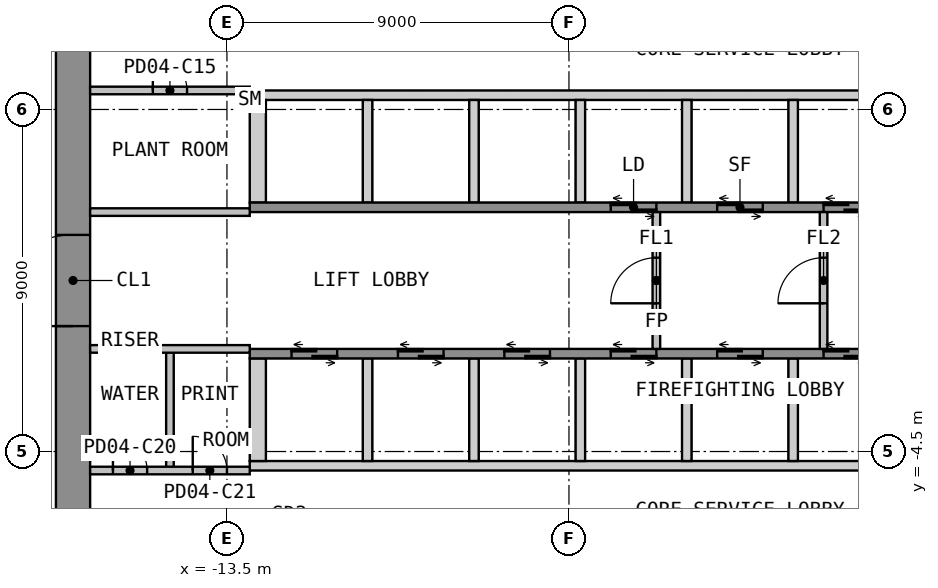
"""IFC4 building model, lengths in metres.
Left out: names, types, materials, properties, quantities, classifications, styles, units other than length and angle.
Written with IfcOpenShell. Run it as: python <this file> out.ifc"""

import sys

from ifc_helpers import new_model, si_unit, direction, frame, frame_2d, origin, place, context, subcontext, project, spatial, polyline, rectangle, outline, extrude, element, fill, save


model = new_model("IFC4")
c1 = context("Model", 3, precision=1e-05, world=origin(), true_north=direction((0.0, 1.0)))
c2 = subcontext(c1, "Body", "Model", "MODEL_VIEW")
j1 = project(units=[si_unit("LENGTHUNIT", "METRE"), si_unit("PLANEANGLEUNIT", "RADIAN")], contexts=[c1])
p1 = place(None, origin())
s1 = spatial("IfcSite", under=j1, at=p1, CompositionType="ELEMENT")
p2 = place(p1, origin())
s2 = spatial("IfcBuilding", under=s1, at=p2, CompositionType="ELEMENT")
p3 = place(p2, frame((0.0, 0.0, 20.4)))
s3 = spatial("IfcBuildingStorey", under=s2, at=p3, CompositionType="ELEMENT", Elevation=20.4)
p4 = place(p3, frame((-17.55, -12.6, 0.0), z_axis=(0.0, 0.0, 1.0), x_axis=(0.0, 1.0, 0.0)))
e1 = element("IfcWall", 1, at=p4, inside=s3, PredefinedType="SHEAR", context=c2, shape_type="SweptSolid", body=[
    extrude(rectangle(XDim=25.2, YDim=0.9, at=frame_2d((12.6, 0.0))), origin(), (0.0, 0.0, 1.0), 4.4),
])
p5 = place(p4, frame((11.4, 0.0, 0.0)))
e2 = element("IfcOpeningElement", 2, at=p5, cuts=e1, PredefinedType="OPENING", context=c2, shape_type="SweptSolid", body=[
    extrude(rectangle(XDim=2.4, YDim=2.1, at=frame_2d((1.2, 1.05))), frame((0.0, 0.46, 0.0), z_axis=(0.0, -1.0, 0.0), x_axis=(1.0, 0.0, 0.0)), (0.0, 0.0, 1.0), 0.92),
])
p6 = place(p3, origin())
e3 = element("IfcWall", 3, at=p6, inside=s3, PredefinedType="SHEAR", context=c2, shape_type="SweptSolid", body=[
    extrude(outline(polyline([(-12.9, 4.75), (12.9, 4.75), (12.9, 5.0), (-12.9, 5.0), (-12.9, 4.75)])), origin(), (0.0, 0.0, 1.0), 4.4),
])
p7 = place(p3, origin())
e4 = element("IfcWall", 4, at=p7, inside=s3, PredefinedType="SHEAR", context=c2, shape_type="SweptSolid", body=[
    extrude(outline(polyline([(-12.9, 2.05), (-12.475, 2.05), (-12.475, 4.75), (-12.9, 4.75), (-12.9, 2.05)])), origin(), (0.0, 0.0, 1.0), 4.4),
])
p8 = place(p3, origin())
e5 = element("IfcWall", 5, at=p8, inside=s3, PredefinedType="SHEAR", context=c2, shape_type="SweptSolid", body=[
    extrude(outline(polyline([(-9.925, 2.05), (-9.675, 2.05), (-9.675, 4.75), (-9.925, 4.75), (-9.925, 2.05)])), origin(), (0.0, 0.0, 1.0), 4.4),
])
p9 = place(p3, origin())
e6 = element("IfcWall", 6, at=p9, inside=s3, PredefinedType="SHEAR", context=c2, shape_type="SweptSolid", body=[
    extrude(outline(polyline([(-7.125, 2.05), (-6.875, 2.05), (-6.875, 4.75), (-7.125, 4.75), (-7.125, 2.05)])), origin(), (0.0, 0.0, 1.0), 4.4),
])
p10 = place(p3, origin())
e7 = element("IfcWall", 7, at=p10, inside=s3, PredefinedType="SHEAR", context=c2, shape_type="SweptSolid", body=[
    extrude(outline(polyline([(-4.325, 2.05), (-4.075, 2.05), (-4.075, 4.75), (-4.325, 4.75), (-4.325, 2.05)])), origin(), (0.0, 0.0, 1.0), 4.4),
])
p11 = place(p3, origin())
e8 = element("IfcWall", 8, at=p11, inside=s3, PredefinedType="SHEAR", context=c2, shape_type="SweptSolid", body=[
    extrude(outline(polyline([(-1.525, 2.05), (-1.275, 2.05), (-1.275, 4.75), (-1.525, 4.75), (-1.525, 2.05)])), origin(), (0.0, 0.0, 1.0), 4.4),
])
p12 = place(p3, origin())
e9 = element("IfcWall", 9, at=p12, inside=s3, PredefinedType="SHEAR", context=c2, shape_type="SweptSolid", body=[
    extrude(outline(polyline([(1.275, 2.05), (1.525, 2.05), (1.525, 4.75), (1.275, 4.75), (1.275, 2.05)])), origin(), (0.0, 0.0, 1.0), 4.4),
])
p13 = place(p3, frame((-12.9, 1.925, 0.0), z_axis=(0.0, 0.0, 1.0), x_axis=(1.0, 0.0, 0.0)))
e10 = element("IfcWall", 10, at=p13, inside=s3, PredefinedType="SHEAR", context=c2, shape_type="SweptSolid", body=[
    extrude(rectangle(XDim=25.8, YDim=0.25, at=frame_2d((12.9, 0.0))), origin(), (0.0, 0.0, 1.0), 4.4),
])
p14 = place(p13, frame((9.5, 0.0, 0.0)))
e11 = element("IfcOpeningElement", 11, at=p14, cuts=e10, PredefinedType="OPENING", context=c2, shape_type="SweptSolid", body=[
    extrude(rectangle(XDim=1.2, YDim=2.1, at=frame_2d((0.6, 1.05))), frame((0.0, 0.135, 0.0), z_axis=(0.0, -1.0, 0.0), x_axis=(1.0, 0.0, 0.0)), (0.0, 0.0, 1.0), 0.27),
])
p15 = place(p13, frame((12.3, 0.0, 0.0)))
e12 = element("IfcOpeningElement", 12, at=p15, cuts=e10, PredefinedType="OPENING", context=c2, shape_type="SweptSolid", body=[
    extrude(rectangle(XDim=1.2, YDim=2.1, at=frame_2d((0.6, 1.05))), frame((0.0, 0.135, 0.0), z_axis=(0.0, -1.0, 0.0), x_axis=(1.0, 0.0, 0.0)), (0.0, 0.0, 1.0), 0.27),
])
p16 = place(p13, frame((15.1, 0.0, 0.0)))
e13 = element("IfcOpeningElement", 13, at=p16, cuts=e10, PredefinedType="OPENING", context=c2, shape_type="SweptSolid", body=[
    extrude(rectangle(XDim=1.2, YDim=2.1, at=frame_2d((0.6, 1.05))), frame((0.0, 0.135, 0.0), z_axis=(0.0, -1.0, 0.0), x_axis=(1.0, 0.0, 0.0)), (0.0, 0.0, 1.0), 0.27),
])
p17 = place(p13, frame((17.9, 0.0, 0.0)))
e14 = element("IfcOpeningElement", 14, at=p17, cuts=e10, PredefinedType="OPENING", context=c2, shape_type="SweptSolid", body=[
    extrude(rectangle(XDim=1.2, YDim=2.1, at=frame_2d((0.6, 1.05))), frame((0.0, 0.135, 0.0), z_axis=(0.0, -1.0, 0.0), x_axis=(1.0, 0.0, 0.0)), (0.0, 0.0, 1.0), 0.27),
])
p18 = place(p13, frame((20.7, 0.0, 0.0)))
e15 = element("IfcOpeningElement", 15, at=p18, cuts=e10, PredefinedType="OPENING", context=c2, shape_type="SweptSolid", body=[
    extrude(rectangle(XDim=1.2, YDim=2.1, at=frame_2d((0.6, 1.05))), frame((0.0, 0.135, 0.0), z_axis=(0.0, -1.0, 0.0), x_axis=(1.0, 0.0, 0.0)), (0.0, 0.0, 1.0), 0.27),
])
p19 = place(p13, frame((23.5, 0.0, 0.0)))
e16 = element("IfcOpeningElement", 16, at=p19, cuts=e10, PredefinedType="OPENING", context=c2, shape_type="SweptSolid", body=[
    extrude(rectangle(XDim=1.2, YDim=2.1, at=frame_2d((0.6, 1.05))), frame((0.0, 0.135, 0.0), z_axis=(0.0, -1.0, 0.0), x_axis=(1.0, 0.0, 0.0)), (0.0, 0.0, 1.0), 0.27),
])
p20 = place(p3, origin())
e17 = element("IfcWall", 17, at=p20, inside=s3, PredefinedType="SHEAR", context=c2, shape_type="SweptSolid", body=[
    extrude(outline(polyline([(-12.9, -5.0), (12.9, -5.0), (12.9, -4.75), (-12.9, -4.75), (-12.9, -5.0)])), origin(), (0.0, 0.0, 1.0), 4.4),
])
p21 = place(p3, origin())
e18 = element("IfcWall", 18, at=p21, inside=s3, PredefinedType="SHEAR", context=c2, shape_type="SweptSolid", body=[
    extrude(outline(polyline([(-12.9, -4.75), (-12.475, -4.75), (-12.475, -2.05), (-12.9, -2.05), (-12.9, -4.75)])), origin(), (0.0, 0.0, 1.0), 4.4),
])
p22 = place(p3, origin())
e19 = element("IfcWall", 19, at=p22, inside=s3, PredefinedType="SHEAR", context=c2, shape_type="SweptSolid", body=[
    extrude(outline(polyline([(-9.925, -4.75), (-9.675, -4.75), (-9.675, -2.05), (-9.925, -2.05), (-9.925, -4.75)])), origin(), (0.0, 0.0, 1.0), 4.4),
])
p23 = place(p3, origin())
e20 = element("IfcWall", 20, at=p23, inside=s3, PredefinedType="SHEAR", context=c2, shape_type="SweptSolid", body=[
    extrude(outline(polyline([(-7.125, -4.75), (-6.875, -4.75), (-6.875, -2.05), (-7.125, -2.05), (-7.125, -4.75)])), origin(), (0.0, 0.0, 1.0), 4.4),
])
p24 = place(p3, origin())
e21 = element("IfcWall", 21, at=p24, inside=s3, PredefinedType="SHEAR", context=c2, shape_type="SweptSolid", body=[
    extrude(outline(polyline([(-4.325, -4.75), (-4.075, -4.75), (-4.075, -2.05), (-4.325, -2.05), (-4.325, -4.75)])), origin(), (0.0, 0.0, 1.0), 4.4),
])
p25 = place(p3, origin())
e22 = element("IfcWall", 22, at=p25, inside=s3, PredefinedType="SHEAR", context=c2, shape_type="SweptSolid", body=[
    extrude(outline(polyline([(-1.525, -4.75), (-1.275, -4.75), (-1.275, -2.05), (-1.525, -2.05), (-1.525, -4.75)])), origin(), (0.0, 0.0, 1.0), 4.4),
])
p26 = place(p3, origin())
e23 = element("IfcWall", 23, at=p26, inside=s3, PredefinedType="SHEAR", context=c2, shape_type="SweptSolid", body=[
    extrude(outline(polyline([(1.275, -4.75), (1.525, -4.75), (1.525, -2.05), (1.275, -2.05), (1.275, -4.75)])), origin(), (0.0, 0.0, 1.0), 4.4),
])
p27 = place(p3, frame((-12.9, -1.925, 0.0), z_axis=(0.0, 0.0, 1.0), x_axis=(1.0, 0.0, 0.0)))
e24 = element("IfcWall", 24, at=p27, inside=s3, PredefinedType="SHEAR", context=c2, shape_type="SweptSolid", body=[
    extrude(rectangle(XDim=25.8, YDim=0.25, at=frame_2d((12.9, 0.0))), origin(), (0.0, 0.0, 1.0), 4.4),
])
p28 = place(p27, frame((1.1, 0.0, 0.0)))
e25 = element("IfcOpeningElement", 25, at=p28, cuts=e24, PredefinedType="OPENING", context=c2, shape_type="SweptSolid", body=[
    extrude(rectangle(XDim=1.2, YDim=2.1, at=frame_2d((0.6, 1.05))), frame((0.0, 0.135, 0.0), z_axis=(0.0, -1.0, 0.0), x_axis=(1.0, 0.0, 0.0)), (0.0, 0.0, 1.0), 0.27),
])
p29 = place(p27, frame((3.9, 0.0, 0.0)))
e26 = element("IfcOpeningElement", 26, at=p29, cuts=e24, PredefinedType="OPENING", context=c2, shape_type="SweptSolid", body=[
    extrude(rectangle(XDim=1.2, YDim=2.1, at=frame_2d((0.6, 1.05))), frame((0.0, 0.135, 0.0), z_axis=(0.0, -1.0, 0.0), x_axis=(1.0, 0.0, 0.0)), (0.0, 0.0, 1.0), 0.27),
])
p30 = place(p27, frame((6.7, 0.0, 0.0)))
e27 = element("IfcOpeningElement", 27, at=p30, cuts=e24, PredefinedType="OPENING", context=c2, shape_type="SweptSolid", body=[
    extrude(rectangle(XDim=1.2, YDim=2.1, at=frame_2d((0.6, 1.05))), frame((0.0, 0.135, 0.0), z_axis=(0.0, -1.0, 0.0), x_axis=(1.0, 0.0, 0.0)), (0.0, 0.0, 1.0), 0.27),
])
p31 = place(p27, frame((9.5, 0.0, 0.0)))
e28 = element("IfcOpeningElement", 28, at=p31, cuts=e24, PredefinedType="OPENING", context=c2, shape_type="SweptSolid", body=[
    extrude(rectangle(XDim=1.2, YDim=2.1, at=frame_2d((0.6, 1.05))), frame((0.0, 0.135, 0.0), z_axis=(0.0, -1.0, 0.0), x_axis=(1.0, 0.0, 0.0)), (0.0, 0.0, 1.0), 0.27),
])
p32 = place(p27, frame((12.3, 0.0, 0.0)))
e29 = element("IfcOpeningElement", 29, at=p32, cuts=e24, PredefinedType="OPENING", context=c2, shape_type="SweptSolid", body=[
    extrude(rectangle(XDim=1.2, YDim=2.1, at=frame_2d((0.6, 1.05))), frame((0.0, 0.135, 0.0), z_axis=(0.0, -1.0, 0.0), x_axis=(1.0, 0.0, 0.0)), (0.0, 0.0, 1.0), 0.27),
])
p33 = place(p27, frame((15.1, 0.0, 0.0)))
e30 = element("IfcOpeningElement", 30, at=p33, cuts=e24, PredefinedType="OPENING", context=c2, shape_type="SweptSolid", body=[
    extrude(rectangle(XDim=1.2, YDim=2.1, at=frame_2d((0.6, 1.05))), frame((0.0, 0.135, 0.0), z_axis=(0.0, -1.0, 0.0), x_axis=(1.0, 0.0, 0.0)), (0.0, 0.0, 1.0), 0.27),
])
p34 = place(p3, frame((-2.2, -1.8, 0.0), z_axis=(0.0, 0.0, 1.0), x_axis=(0.0, 1.0, 0.0)))
e31 = element("IfcWall", 31, at=p34, inside=s3, PredefinedType="PARTITIONING", context=c2, shape_type="SweptSolid", body=[
    extrude(rectangle(XDim=3.6, YDim=0.2, at=frame_2d((1.8, 0.0))), origin(), (0.0, 0.0, 1.0), 4.4),
])
p35 = place(p34, frame((1.2, 0.0, 0.0)))
e32 = element("IfcOpeningElement", 32, at=p35, cuts=e31, PredefinedType="OPENING", context=c2, shape_type="SweptSolid", body=[
    extrude(rectangle(XDim=1.2, YDim=2.1, at=frame_2d((0.6, 1.05))), frame((0.0, 0.11, 0.0), z_axis=(0.0, -1.0, 0.0), x_axis=(1.0, 0.0, 0.0)), (0.0, 0.0, 1.0), 0.22),
])
p36 = place(p3, frame((2.2, -1.8, 0.0), z_axis=(0.0, 0.0, 1.0), x_axis=(0.0, 1.0, 0.0)))
e33 = element("IfcWall", 33, at=p36, inside=s3, PredefinedType="PARTITIONING", context=c2, shape_type="SweptSolid", body=[
    extrude(rectangle(XDim=3.6, YDim=0.2, at=frame_2d((1.8, 0.0))), origin(), (0.0, 0.0, 1.0), 4.4),
])
p37 = place(p36, frame((1.2, 0.0, 0.0)))
e34 = element("IfcOpeningElement", 34, at=p37, cuts=e33, PredefinedType="OPENING", context=c2, shape_type="SweptSolid", body=[
    extrude(rectangle(XDim=1.2, YDim=2.1, at=frame_2d((0.6, 1.05))), frame((0.0, 0.11, 0.0), z_axis=(0.0, -1.0, 0.0), x_axis=(1.0, 0.0, 0.0)), (0.0, 0.0, 1.0), 0.22),
])
p38 = place(p3, frame((-17.1, 5.0, 0.0), z_axis=(0.0, 0.0, 1.0), x_axis=(1.0, 0.0, 0.0)))
e35 = element("IfcWall", 35, at=p38, inside=s3, PredefinedType="PARTITIONING", context=c2, shape_type="SweptSolid", body=[
    extrude(rectangle(XDim=4.2, YDim=0.2, at=frame_2d((2.1, 0.0))), origin(), (0.0, 0.0, 1.0), 4.4),
])
p39 = place(p38, frame((1.65, 0.0, 0.0)))
e36 = element("IfcOpeningElement", 36, at=p39, cuts=e35, PredefinedType="OPENING", context=c2, shape_type="SweptSolid", body=[
    extrude(rectangle(XDim=0.9, YDim=2.1, at=frame_2d((0.45, 1.05))), frame((0.0, 0.11, 0.0), z_axis=(0.0, -1.0, 0.0), x_axis=(1.0, 0.0, 0.0)), (0.0, 0.0, 1.0), 0.22),
])
p40 = place(p3, frame((-17.1, 1.8, 0.0), z_axis=(0.0, 0.0, 1.0), x_axis=(1.0, 0.0, 0.0)))
e37 = element("IfcWall", 37, at=p40, inside=s3, PredefinedType="PARTITIONING", context=c2, shape_type="SweptSolid", body=[
    extrude(rectangle(XDim=4.2, YDim=0.2, at=frame_2d((2.1, 0.0))), origin(), (0.0, 0.0, 1.0), 4.4),
])
p41 = place(p3, frame((-15.0, -5.0, 0.0), z_axis=(0.0, 0.0, 1.0), x_axis=(0.0, 1.0, 0.0)))
e38 = element("IfcWall", 38, at=p41, inside=s3, PredefinedType="PARTITIONING", context=c2, shape_type="SweptSolid", body=[
    extrude(rectangle(XDim=3.2, YDim=0.2, at=frame_2d((1.6, 0.0))), origin(), (0.0, 0.0, 1.0), 4.4),
])
p42 = place(p3, frame((-17.1, -5.0, 0.0), z_axis=(0.0, 0.0, 1.0), x_axis=(1.0, 0.0, 0.0)))
e39 = element("IfcWall", 39, at=p42, inside=s3, PredefinedType="PARTITIONING", context=c2, shape_type="SweptSolid", body=[
    extrude(rectangle(XDim=4.2, YDim=0.2, at=frame_2d((2.1, 0.0))), origin(), (0.0, 0.0, 1.0), 4.4),
])
p43 = place(p42, frame((0.6, 0.0, 0.0)))
e40 = element("IfcOpeningElement", 40, at=p43, cuts=e39, PredefinedType="OPENING", context=c2, shape_type="SweptSolid", body=[
    extrude(rectangle(XDim=0.9, YDim=2.1, at=frame_2d((0.45, 1.05))), frame((0.0, 0.11, 0.0), z_axis=(0.0, -1.0, 0.0), x_axis=(1.0, 0.0, 0.0)), (0.0, 0.0, 1.0), 0.22),
])
p44 = place(p42, frame((2.7, 0.0, 0.0)))
e41 = element("IfcOpeningElement", 41, at=p44, cuts=e39, PredefinedType="OPENING", context=c2, shape_type="SweptSolid", body=[
    extrude(rectangle(XDim=0.9, YDim=2.1, at=frame_2d((0.45, 1.05))), frame((0.0, 0.11, 0.0), z_axis=(0.0, -1.0, 0.0), x_axis=(1.0, 0.0, 0.0)), (0.0, 0.0, 1.0), 0.22),
])
p45 = place(p3, frame((-17.1, -1.8, 0.0), z_axis=(0.0, 0.0, 1.0), x_axis=(1.0, 0.0, 0.0)))
e42 = element("IfcWall", 42, at=p45, inside=s3, PredefinedType="PARTITIONING", context=c2, shape_type="SweptSolid", body=[
    extrude(rectangle(XDim=4.2, YDim=0.2, at=frame_2d((2.1, 0.0))), origin(), (0.0, 0.0, 1.0), 4.4),
])
p46 = place(p5, origin())
e43 = element("IfcDoor", 43, at=p46, inside=s3, OperationType="DOUBLE_DOOR_DOUBLE_SWING", PredefinedType="DOOR", context=c2, shape_type="SweptSolid", body=[
    extrude(rectangle(XDim=2.4, YDim=2.1, at=frame_2d((1.2, 1.05))), frame((0.0, 0.025, 0.0), z_axis=(0.0, -1.0, 0.0), x_axis=(1.0, 0.0, 0.0)), (0.0, 0.0, 1.0), 0.05),
])
fill(e2, e43)
p47 = place(p14, origin())
e44 = element("IfcDoor", 44, at=p47, inside=s3, OperationType="DOUBLE_DOOR_SLIDING", PredefinedType="DOOR", context=c2, shape_type="SweptSolid", body=[
    extrude(rectangle(XDim=1.2, YDim=2.1, at=frame_2d((0.6, 1.05))), frame((0.0, 0.025, 0.0), z_axis=(0.0, -1.0, 0.0), x_axis=(1.0, 0.0, 0.0)), (0.0, 0.0, 1.0), 0.05),
])
fill(e11, e44)
p48 = place(p15, origin())
e45 = element("IfcDoor", 45, at=p48, inside=s3, OperationType="DOUBLE_DOOR_SLIDING", PredefinedType="DOOR", context=c2, shape_type="SweptSolid", body=[
    extrude(rectangle(XDim=1.2, YDim=2.1, at=frame_2d((0.6, 1.05))), frame((0.0, 0.025, 0.0), z_axis=(0.0, -1.0, 0.0), x_axis=(1.0, 0.0, 0.0)), (0.0, 0.0, 1.0), 0.05),
])
fill(e12, e45)
p49 = place(p16, origin())
e46 = element("IfcDoor", 46, at=p49, inside=s3, OperationType="DOUBLE_DOOR_SLIDING", PredefinedType="DOOR", context=c2, shape_type="SweptSolid", body=[
    extrude(rectangle(XDim=1.2, YDim=2.1, at=frame_2d((0.6, 1.05))), frame((0.0, 0.025, 0.0), z_axis=(0.0, -1.0, 0.0), x_axis=(1.0, 0.0, 0.0)), (0.0, 0.0, 1.0), 0.05),
])
fill(e13, e46)
p50 = place(p28, origin())
e47 = element("IfcDoor", 47, at=p50, inside=s3, OperationType="DOUBLE_DOOR_SLIDING", PredefinedType="DOOR", context=c2, shape_type="SweptSolid", body=[
    extrude(rectangle(XDim=1.2, YDim=2.1, at=frame_2d((0.6, 1.05))), frame((0.0, 0.025, 0.0), z_axis=(0.0, -1.0, 0.0), x_axis=(1.0, 0.0, 0.0)), (0.0, 0.0, 1.0), 0.05),
])
fill(e25, e47)
p51 = place(p29, origin())
e48 = element("IfcDoor", 48, at=p51, inside=s3, OperationType="DOUBLE_DOOR_SLIDING", PredefinedType="DOOR", context=c2, shape_type="SweptSolid", body=[
    extrude(rectangle(XDim=1.2, YDim=2.1, at=frame_2d((0.6, 1.05))), frame((0.0, 0.025, 0.0), z_axis=(0.0, -1.0, 0.0), x_axis=(1.0, 0.0, 0.0)), (0.0, 0.0, 1.0), 0.05),
])
fill(e26, e48)
p52 = place(p30, origin())
e49 = element("IfcDoor", 49, at=p52, inside=s3, OperationType="DOUBLE_DOOR_SLIDING", PredefinedType="DOOR", context=c2, shape_type="SweptSolid", body=[
    extrude(rectangle(XDim=1.2, YDim=2.1, at=frame_2d((0.6, 1.05))), frame((0.0, 0.025, 0.0), z_axis=(0.0, -1.0, 0.0), x_axis=(1.0, 0.0, 0.0)), (0.0, 0.0, 1.0), 0.05),
])
fill(e27, e49)
p53 = place(p31, origin())
e50 = element("IfcDoor", 50, at=p53, inside=s3, OperationType="DOUBLE_DOOR_SLIDING", PredefinedType="DOOR", context=c2, shape_type="SweptSolid", body=[
    extrude(rectangle(XDim=1.2, YDim=2.1, at=frame_2d((0.6, 1.05))), frame((0.0, 0.025, 0.0), z_axis=(0.0, -1.0, 0.0), x_axis=(1.0, 0.0, 0.0)), (0.0, 0.0, 1.0), 0.05),
])
fill(e28, e50)
p54 = place(p32, origin())
e51 = element("IfcDoor", 51, at=p54, inside=s3, OperationType="DOUBLE_DOOR_SLIDING", PredefinedType="DOOR", context=c2, shape_type="SweptSolid", body=[
    extrude(rectangle(XDim=1.2, YDim=2.1, at=frame_2d((0.6, 1.05))), frame((0.0, 0.025, 0.0), z_axis=(0.0, -1.0, 0.0), x_axis=(1.0, 0.0, 0.0)), (0.0, 0.0, 1.0), 0.05),
])
fill(e29, e51)
p55 = place(p33, origin())
e52 = element("IfcDoor", 52, at=p55, inside=s3, OperationType="DOUBLE_DOOR_SLIDING", PredefinedType="DOOR", context=c2, shape_type="SweptSolid", body=[
    extrude(rectangle(XDim=1.2, YDim=2.1, at=frame_2d((0.6, 1.05))), frame((0.0, 0.025, 0.0), z_axis=(0.0, -1.0, 0.0), x_axis=(1.0, 0.0, 0.0)), (0.0, 0.0, 1.0), 0.05),
])
fill(e30, e52)
p56 = place(p35, origin())
e53 = element("IfcDoor", 53, at=p56, inside=s3, OperationType="SINGLE_SWING_LEFT", PredefinedType="DOOR", context=c2, shape_type="SweptSolid", body=[
    extrude(rectangle(XDim=1.2, YDim=2.1, at=frame_2d((0.6, 1.05))), frame((0.0, 0.025, 0.0), z_axis=(0.0, -1.0, 0.0), x_axis=(1.0, 0.0, 0.0)), (0.0, 0.0, 1.0), 0.05),
])
fill(e32, e53)
p57 = place(p37, origin())
e54 = element("IfcDoor", 54, at=p57, inside=s3, OperationType="SINGLE_SWING_LEFT", PredefinedType="DOOR", context=c2, shape_type="SweptSolid", body=[
    extrude(rectangle(XDim=1.2, YDim=2.1, at=frame_2d((0.6, 1.05))), frame((0.0, 0.025, 0.0), z_axis=(0.0, -1.0, 0.0), x_axis=(1.0, 0.0, 0.0)), (0.0, 0.0, 1.0), 0.05),
])
fill(e34, e54)
p58 = place(p39, origin())
e55 = element("IfcDoor", 55, at=p58, inside=s3, OperationType="SINGLE_SWING_LEFT", PredefinedType="DOOR", context=c2, shape_type="SweptSolid", body=[
    extrude(rectangle(XDim=0.9, YDim=2.1, at=frame_2d((0.45, 1.05))), frame((0.0, 0.025, 0.0), z_axis=(0.0, -1.0, 0.0), x_axis=(1.0, 0.0, 0.0)), (0.0, 0.0, 1.0), 0.05),
])
fill(e36, e55)
p59 = place(p43, origin())
e56 = element("IfcDoor", 56, at=p59, inside=s3, OperationType="SINGLE_SWING_LEFT", PredefinedType="DOOR", context=c2, shape_type="SweptSolid", body=[
    extrude(rectangle(XDim=0.9, YDim=2.1, at=frame_2d((0.45, 1.05))), frame((0.0, 0.025, 0.0), z_axis=(0.0, -1.0, 0.0), x_axis=(1.0, 0.0, 0.0)), (0.0, 0.0, 1.0), 0.05),
])
fill(e40, e56)
p60 = place(p44, origin())
e57 = element("IfcDoor", 57, at=p60, inside=s3, OperationType="SINGLE_SWING_LEFT", PredefinedType="DOOR", context=c2, shape_type="SweptSolid", body=[
    extrude(rectangle(XDim=0.9, YDim=2.1, at=frame_2d((0.45, 1.05))), frame((0.0, 0.025, 0.0), z_axis=(0.0, -1.0, 0.0), x_axis=(1.0, 0.0, 0.0)), (0.0, 0.0, 1.0), 0.05),
])
fill(e41, e57)
save(model, sys.argv[1])
